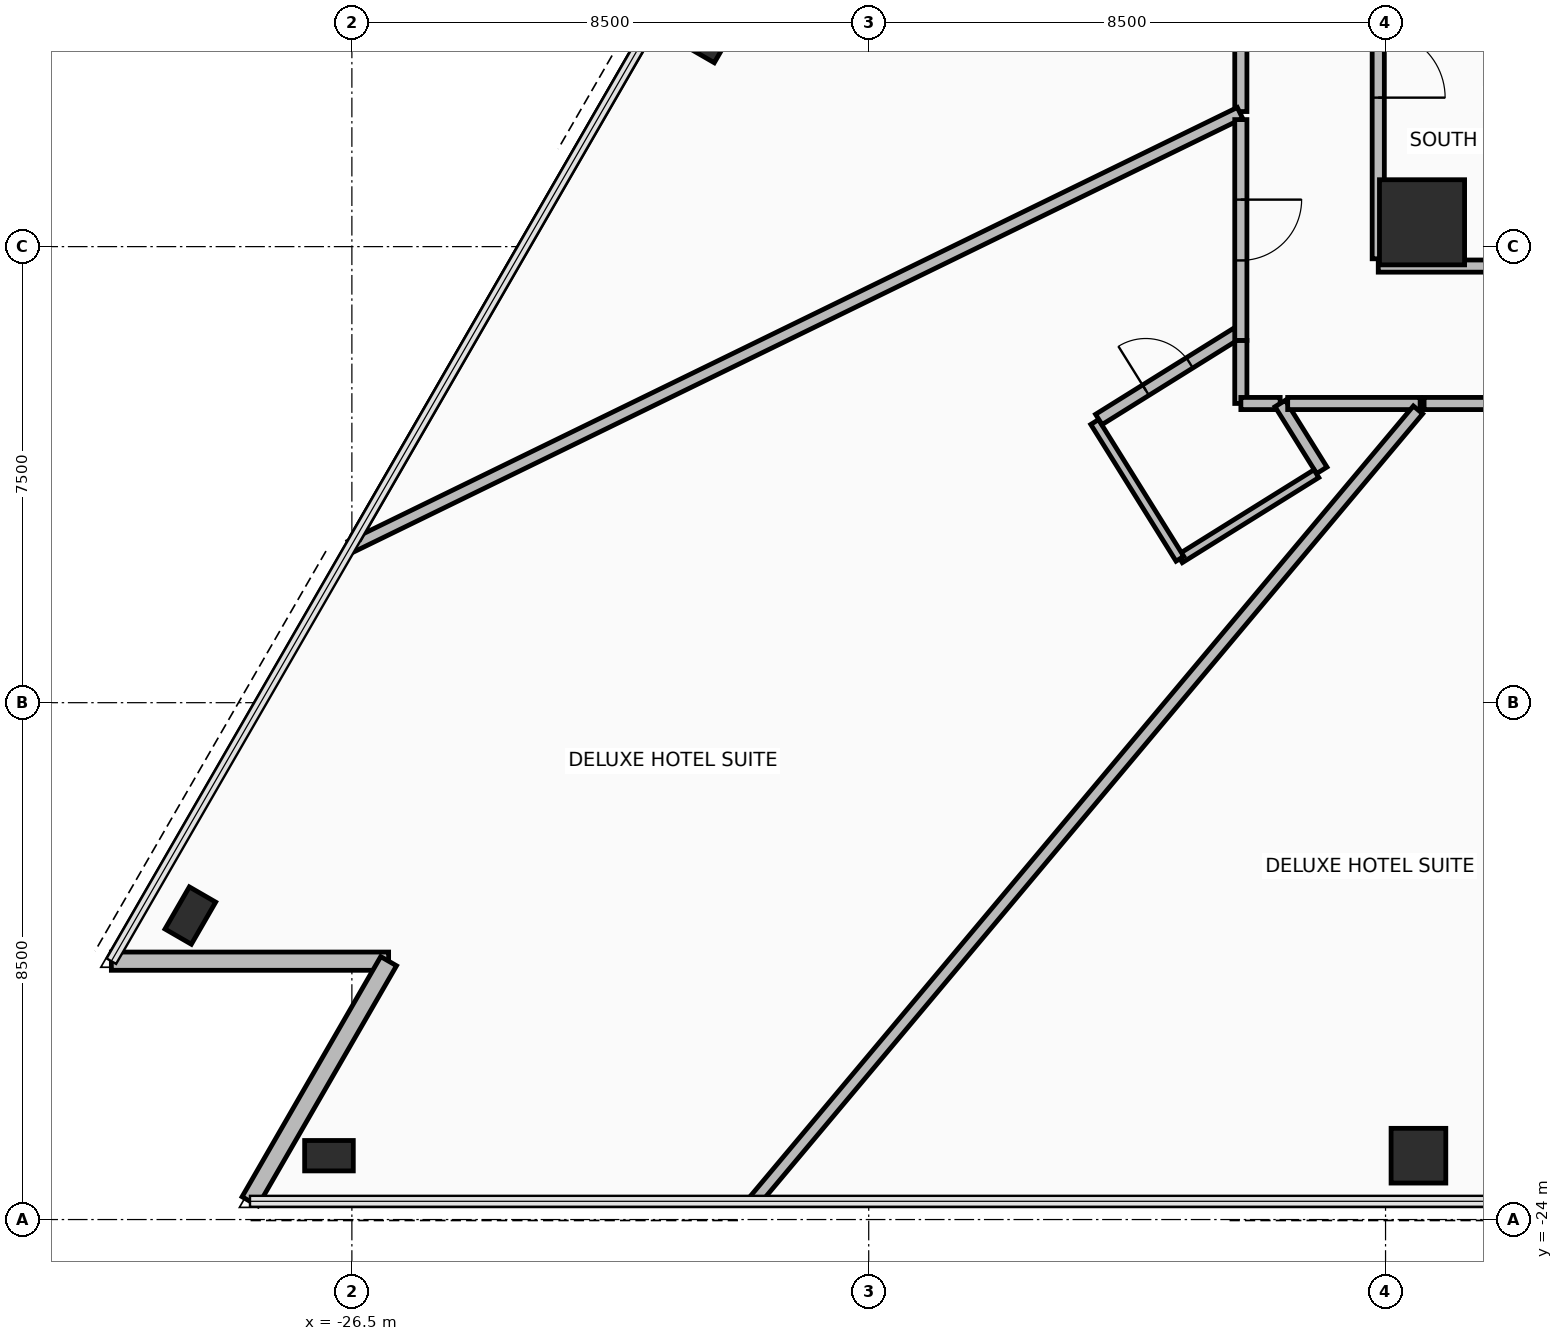
"""IFC4 building model, lengths in metres.
Left out: names, types, materials, properties, quantities, classifications, styles, units other than length and angle.
Written with IfcOpenShell. Run it as: python <this file> out.ifc"""

import sys

from ifc_helpers import new_model, si_unit, direction, frame, frame_2d, origin, origin_2d, place, context, subcontext, project, spatial, rectangle, hollow_rectangle, extrude, element, fill, save


model = new_model("IFC4")
c1 = context("Model", 3, precision=1e-05, world=origin(), true_north=direction((0.0, 1.0)))
c2 = subcontext(c1, "Body", "Model", "MODEL_VIEW")
j1 = project(units=[si_unit("LENGTHUNIT", "METRE"), si_unit("PLANEANGLEUNIT", "RADIAN")], contexts=[c1])
p1 = place(None, origin())
s1 = spatial("IfcSite", under=j1, at=p1, CompositionType="ELEMENT")
p2 = place(p1, origin())
s2 = spatial("IfcBuilding", under=s1, at=p2, CompositionType="ELEMENT")
p3 = place(p2, frame((0.0, 0.0, 35.25)))
s3 = spatial("IfcBuildingStorey", under=s2, at=p3, CompositionType="ELEMENT", Elevation=35.25)
p4 = place(p3, frame((-8.9, -7.6, 0.0), z_axis=(0.0, 0.0, 1.0), x_axis=(1.0, 0.0, 0.0)))
e1 = element("IfcColumn", 1, at=p4, inside=s3, PredefinedType="COLUMN", context=c2, shape_type="SweptSolid", body=[
    extrude(rectangle(XDim=1.4, YDim=1.4, at=origin_2d()), origin(), (0.0, 0.0, 1.0), 3.4),
])
p5 = place(p3, frame((-20.705, -4.361, 0.0), z_axis=(0.0, 0.0, 1.0), x_axis=(0.500001511499, 0.866024531118, 0.0)))
e2 = element("IfcColumn", 2, at=p5, inside=s3, PredefinedType="COLUMN", context=c2, shape_type="SweptSolid", body=[
    extrude(hollow_rectangle(XDim=0.9, YDim=0.9, WallThickness=0.05, at=origin_2d()), origin(), (0.0, 0.0, 1.0), 3.4),
])
for number, where, z_axis, x_axis in (
    (3, (-29.157, -19.001, 0.0), (0.0, 0.0, 1.0), (0.5, 0.866, 0.0)),
    (4, (-26.877, -22.95, 0.0), (0.0, 0.0, 1.0), (1.0, 0.0, 0.0)),
):
    element("IfcColumn", number, at=place(p3, frame(where, z_axis=z_axis, x_axis=x_axis)), inside=s3, PredefinedType="COLUMN", context=c2, shape_type="SweptSolid", body=[
        extrude(hollow_rectangle(XDim=0.5, YDim=0.8, WallThickness=0.04, at=origin_2d()), origin(), (0.0, 0.0, 1.0), 3.4),
    ])
p6 = place(p3, frame((-8.959, -22.95, 0.0), z_axis=(0.0, 0.0, 1.0), x_axis=(1.0, 0.0, 0.0)))
e5 = element("IfcColumn", 5, at=p6, inside=s3, PredefinedType="COLUMN", context=c2, shape_type="SweptSolid", body=[
    extrude(hollow_rectangle(XDim=0.9, YDim=0.9, WallThickness=0.05, at=origin_2d()), origin(), (0.0, 0.0, 1.0), 3.4),
])
p7 = place(p3, frame((-30.456, -19.751, 0.0), z_axis=(0.0, 0.0, 1.0), x_axis=(1.0, 0.0, 0.0)))
e6 = element("IfcWall", 6, at=p7, inside=s3, PredefinedType="STANDARD", context=c2, shape_type="SweptSolid", body=[
    extrude(rectangle(XDim=4.56, YDim=0.3, at=frame_2d((2.28, 0.0))), origin(), (0.0, 0.0, 1.0), 2.42),
])
p8 = place(p3, frame((-25.896, -19.751, 0.0), z_axis=(0.0, 0.0, 1.0), x_axis=(-0.500014431597, -0.866017071537, 0.0)))
e7 = element("IfcWall", 7, at=p8, inside=s3, PredefinedType="STANDARD", context=c2, shape_type="SweptSolid", body=[
    extrude(rectangle(XDim=4.56, YDim=0.3, at=frame_2d((2.28, 0.0))), origin(), (0.0, 0.0, 1.0), 2.42),
])
p9 = place(p3, frame((-9.62, -8.32, 0.0), z_axis=(0.0, 0.0, 1.0), x_axis=(1.0, 0.0, 0.0)))
e8 = element("IfcWall", 8, at=p9, inside=s3, PredefinedType="PARTITIONING", context=c2, shape_type="SweptSolid", body=[
    extrude(rectangle(XDim=19.24, YDim=0.2, at=frame_2d((9.62, 0.0))), origin(), (0.0, 0.0, 1.0), 2.62),
])
p10 = place(p9, frame((15.02, 0.0, 0.0)))
e9 = element("IfcOpeningElement", 9, at=p10, cuts=e8, PredefinedType="OPENING", context=c2, shape_type="SweptSolid", body=[
    extrude(rectangle(XDim=0.9, YDim=2.1, at=frame_2d((0.45, 1.05))), frame((0.0, 0.11, 0.0), z_axis=(0.0, -1.0, 0.0), x_axis=(1.0, 0.0, 0.0)), (0.0, 0.0, 1.0), 0.22),
])
p11 = place(p3, frame((-9.62, 8.2, 0.0), z_axis=(0.0, 0.0, 1.0), x_axis=(0.0, -1.0, 0.0)))
e10 = element("IfcWall", 10, at=p11, inside=s3, PredefinedType="PARTITIONING", context=c2, shape_type="SweptSolid", body=[
    extrude(rectangle(XDim=16.4, YDim=0.2, at=frame_2d((8.2, 0.0))), origin(), (0.0, 0.0, 1.0), 2.62),
])
p12 = place(p11, frame((12.65, 0.0, 0.0)))
e11 = element("IfcOpeningElement", 11, at=p12, cuts=e10, PredefinedType="OPENING", context=c2, shape_type="SweptSolid", body=[
    extrude(rectangle(XDim=1.1, YDim=2.15, at=frame_2d((0.55, 1.075))), frame((0.0, 0.11, 0.0), z_axis=(0.0, -1.0, 0.0), x_axis=(1.0, 0.0, 0.0)), (0.0, 0.0, 1.0), 0.22),
])
p13 = place(p3, frame((-11.88, -9.542, 0.0), z_axis=(0.0, 0.0, 1.0), x_axis=(0.0, -1.0, 0.0)))
e12 = element("IfcWall", 12, at=p13, inside=s3, PredefinedType="PARTITIONING", context=c2, shape_type="SweptSolid", body=[
    extrude(rectangle(XDim=1.037, YDim=0.2, at=frame_2d((0.519, 0.0))), origin(), (0.0, 0.0, 1.0), 2.62),
])
p14 = place(p3, frame((-11.879, -10.58, 0.0), z_axis=(0.0, 0.0, 1.0), x_axis=(1.0, 0.0, 0.0)))
e13 = element("IfcWall", 13, at=p14, inside=s3, PredefinedType="PARTITIONING", context=c2, shape_type="SweptSolid", body=[
    extrude(rectangle(XDim=0.646, YDim=0.2, at=frame_2d((0.323, 0.0))), origin(), (0.0, 0.0, 1.0), 3.225),
])
p15 = place(p3, frame((-11.233, -10.58, 0.0), z_axis=(0.0, 0.0, 1.0), x_axis=(0.528981470097, -0.848633374487, 0.0)))
e14 = element("IfcWall", 14, at=p15, inside=s3, PredefinedType="PARTITIONING", context=c2, shape_type="SweptSolid", body=[
    extrude(rectangle(XDim=1.295, YDim=0.2, at=frame_2d((0.647, 0.0))), origin(), (0.0, 0.0, 1.0), 3.225),
])
p16 = place(p3, frame((-10.637, -11.734, 0.0), z_axis=(0.0, 0.0, 1.0), x_axis=(-0.848630335856, -0.528986344876, 0.0)))
e15 = element("IfcWall", 15, at=p16, inside=s3, PredefinedType="PARTITIONING", context=c2, shape_type="SweptSolid", body=[
    extrude(rectangle(XDim=2.645, YDim=0.15, at=frame_2d((1.323, 0.0))), origin(), (0.0, 0.0, 1.0), 3.225),
])
p17 = place(p3, frame((-12.882, -13.133, 0.0), z_axis=(0.0, 0.0, 1.0), x_axis=(-0.529013096747, 0.848613659724, 0.0)))
e16 = element("IfcWall", 16, at=p17, inside=s3, PredefinedType="PARTITIONING", context=c2, shape_type="SweptSolid", body=[
    extrude(rectangle(XDim=2.65, YDim=0.15, at=frame_2d((1.325, 0.0))), origin(), (0.0, 0.0, 1.0), 2.62),
])
p18 = place(p3, frame((-14.216, -10.842, 0.0), z_axis=(0.0, 0.0, 1.0), x_axis=(0.848598757422, 0.529037001449, 0.0)))
e17 = element("IfcWall", 17, at=p18, inside=s3, PredefinedType="PARTITIONING", context=c2, shape_type="SweptSolid", body=[
    extrude(rectangle(XDim=2.67, YDim=0.2, at=frame_2d((1.335, 0.0))), origin(), (0.0, 0.0, 1.0), 2.62),
])
p19 = place(p18, frame((0.91, 0.0, 0.0)))
e18 = element("IfcOpeningElement", 18, at=p19, cuts=e17, PredefinedType="OPENING", context=c2, shape_type="SweptSolid", body=[
    extrude(rectangle(XDim=0.85, YDim=2.1, at=frame_2d((0.425, 1.05))), frame((0.0, 0.11, 0.0), z_axis=(0.0, -1.0, 0.0), x_axis=(1.0, 0.0, 0.0)), (0.0, 0.0, 1.0), 0.22),
])
p20 = place(p3, frame((-11.88, -0.441, 0.0), z_axis=(0.0, 0.0, 1.0), x_axis=(0.0, -1.0, 0.0)))
e19 = element("IfcWall", 19, at=p20, inside=s3, PredefinedType="PARTITIONING", context=c2, shape_type="SweptSolid", body=[
    extrude(rectangle(XDim=5.338, YDim=0.2, at=frame_2d((2.669, 0.0))), origin(), (0.0, 0.0, 1.0), 3.225),
])
p21 = place(p20, frame((2.244, 0.0, 0.0)))
e20 = element("IfcOpeningElement", 20, at=p21, cuts=e19, PredefinedType="OPENING", context=c2, shape_type="SweptSolid", body=[
    extrude(rectangle(XDim=0.85, YDim=2.1, at=frame_2d((0.425, 1.05))), frame((0.0, 0.11, 0.0), z_axis=(0.0, -1.0, 0.0), x_axis=(1.0, 0.0, 0.0)), (0.0, 0.0, 1.0), 0.22),
])
p22 = place(p3, frame((-11.894, -5.801, 0.0), z_axis=(0.0, 0.0, 1.0), x_axis=(-0.898794397302, -0.438370427127, 0.0)))
e21 = element("IfcWall", 21, at=p22, inside=s3, PredefinedType="PARTITIONING", context=c2, shape_type="SweptSolid", body=[
    extrude(rectangle(XDim=16.273, YDim=0.2, at=frame_2d((8.137, 0.0))), origin(), (0.0, 0.0, 1.0), 2.42),
])
p23 = place(p3, frame((-26.427, -12.772, 0.0), z_axis=(0.0, 0.0, 1.0), x_axis=(0.499997662712, 0.866026753214, 0.0)))
e22 = element("IfcWall", 22, at=p23, inside=s3, PredefinedType="PARTITIONING", context=c2, shape_type="SweptSolid", body=[
    extrude(rectangle(XDim=13.95, YDim=0.15, at=frame_2d((6.975, 0.0))), origin(), (0.0, 0.0, 1.0), 3.225),
])
p24 = place(p3, frame((-11.88, -5.911, 0.0), z_axis=(0.0, 0.0, 1.0), x_axis=(0.0, -1.0, 0.0)))
e23 = element("IfcWall", 23, at=p24, inside=s3, PredefinedType="PARTITIONING", context=c2, shape_type="SweptSolid", body=[
    extrude(rectangle(XDim=3.631, YDim=0.2, at=frame_2d((1.816, 0.0))), origin(), (0.0, 0.0, 1.0), 2.62),
])
p25 = place(p24, frame((1.316, 0.0, 0.0)))
e24 = element("IfcOpeningElement", 24, at=p25, cuts=e23, PredefinedType="OPENING", context=c2, shape_type="SweptSolid", body=[
    extrude(rectangle(XDim=1.0, YDim=2.15, at=frame_2d((0.5, 1.075))), frame((0.0, 0.11, 0.0), z_axis=(0.0, -1.0, 0.0), x_axis=(1.0, 0.0, 0.0)), (0.0, 0.0, 1.0), 0.22),
])
p26 = place(p3, frame((-11.11, -10.58, 0.0), z_axis=(0.0, 0.0, 1.0), x_axis=(1.0, 0.0, 0.0)))
e25 = element("IfcWall", 25, at=p26, inside=s3, PredefinedType="PARTITIONING", context=c2, shape_type="SweptSolid", body=[
    extrude(rectangle(XDim=2.178, YDim=0.2, at=frame_2d((1.089, 0.0))), origin(), (0.0, 0.0, 1.0), 2.62),
])
p27 = place(p3, frame((-8.966, -10.685, 0.0), z_axis=(0.0, 0.0, 1.0), x_axis=(-0.642784617016, -0.766046954258, 0.0)))
e26 = element("IfcWall", 26, at=p27, inside=s3, PredefinedType="PARTITIONING", context=c2, shape_type="SweptSolid", body=[
    extrude(rectangle(XDim=16.978, YDim=0.2, at=frame_2d((8.489, 0.0))), origin(), (0.0, 0.0, 1.0), 2.42),
])
p28 = place(p3, frame((-8.866, -10.58, 0.0), z_axis=(0.0, 0.0, 1.0), x_axis=(1.0, 0.0, 0.0)))
e27 = element("IfcWall", 27, at=p28, inside=s3, PredefinedType="PARTITIONING", context=c2, shape_type="SweptSolid", body=[
    extrude(rectangle(XDim=5.799, YDim=0.2, at=frame_2d((2.899, 0.0))), origin(), (0.0, 0.0, 1.0), 2.62),
])
p29 = place(p28, frame((2.12, 0.0, 0.0)))
e28 = element("IfcOpeningElement", 28, at=p29, cuts=e27, PredefinedType="OPENING", context=c2, shape_type="SweptSolid", body=[
    extrude(rectangle(XDim=1.0, YDim=2.15, at=frame_2d((0.5, 1.075))), frame((0.0, 0.11, 0.0), z_axis=(0.0, -1.0, 0.0), x_axis=(1.0, 0.0, 0.0)), (0.0, 0.0, 1.0), 0.22),
])
p30 = place(p12, frame((1.1, 0.0, 0.0), z_axis=(0.0, 0.0, 1.0), x_axis=(-1.0, 0.0, 0.0)))
e29 = element("IfcDoor", 29, at=p30, inside=s3, OperationType="SINGLE_SWING_LEFT", PredefinedType="DOOR", context=c2, shape_type="SweptSolid", body=[
    extrude(rectangle(XDim=1.1, YDim=2.15, at=frame_2d((0.55, 1.075))), frame((0.0, 0.025, 0.0), z_axis=(0.0, -1.0, 0.0), x_axis=(1.0, 0.0, 0.0)), (0.0, 0.0, 1.0), 0.05),
])
fill(e11, e29)
p31 = place(p19, origin())
e30 = element("IfcDoor", 30, at=p31, inside=s3, OperationType="SINGLE_SWING_RIGHT", PredefinedType="DOOR", context=c2, shape_type="SweptSolid", body=[
    extrude(rectangle(XDim=0.85, YDim=2.1, at=frame_2d((0.425, 1.05))), frame((0.0, 0.025, 0.0), z_axis=(0.0, -1.0, 0.0), x_axis=(1.0, 0.0, 0.0)), (0.0, 0.0, 1.0), 0.05),
])
fill(e18, e30)
p32 = place(p25, origin())
e31 = element("IfcDoor", 31, at=p32, inside=s3, OperationType="SINGLE_SWING_LEFT", PredefinedType="DOOR", context=c2, shape_type="SweptSolid", body=[
    extrude(rectangle(XDim=1.0, YDim=2.15, at=frame_2d((0.5, 1.075))), frame((0.0, 0.025, 0.0), z_axis=(0.0, -1.0, 0.0), x_axis=(1.0, 0.0, 0.0)), (0.0, 0.0, 1.0), 0.05),
])
fill(e24, e31)
save(model, sys.argv[1])
